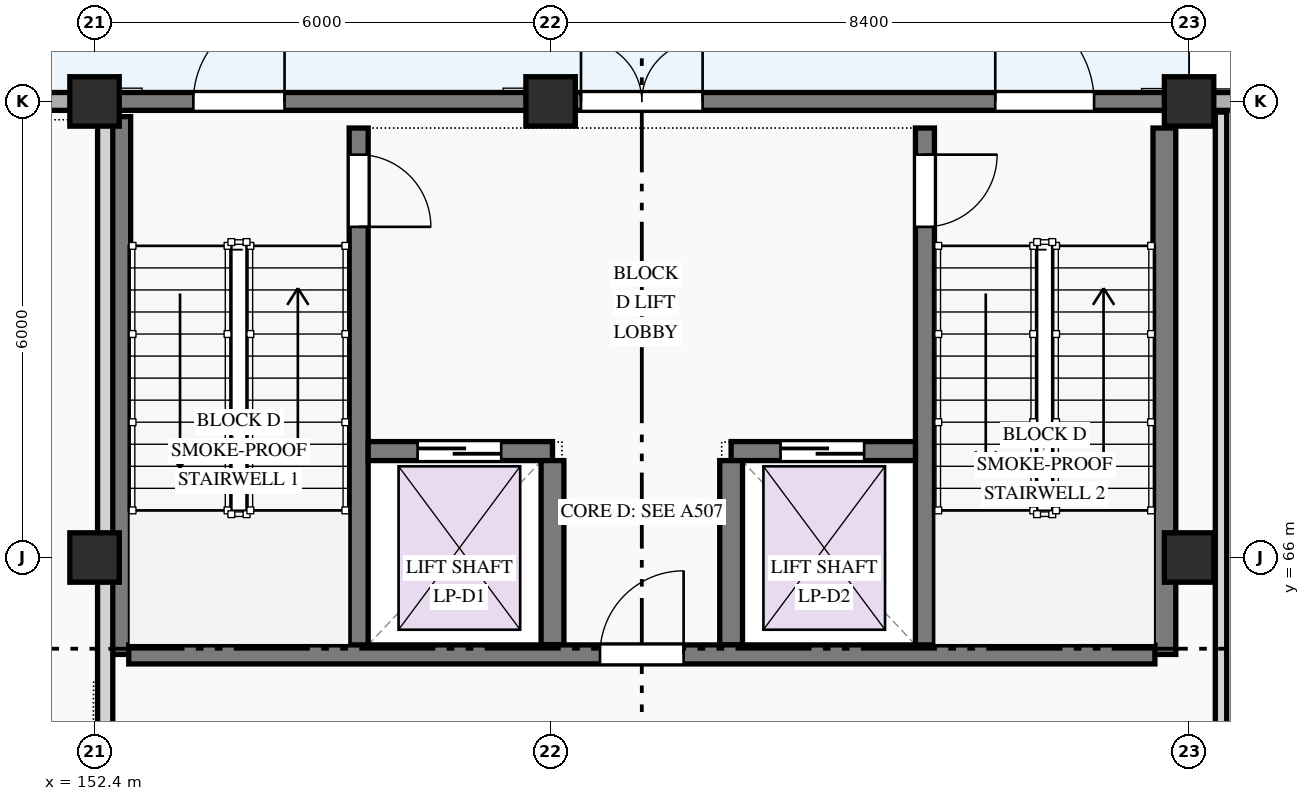
"""IFC4 building model, lengths in metres.
Left out: names, types, materials, properties, quantities, classifications, styles, units other than length and angle.
Written with IfcOpenShell. Run it as: python <this file> out.ifc"""

import sys

from ifc_helpers import new_model, si_unit, direction, frame, frame_2d, origin, origin_2d, place, context, subcontext, project, spatial, rectangle, extrude, element, fill, save


model = new_model("IFC4")
c1 = context("Model", 3, precision=1e-05, world=origin(), true_north=direction((0.0, 1.0)))
c2 = subcontext(c1, "Body", "Model", "MODEL_VIEW")
j1 = project(units=[si_unit("LENGTHUNIT", "METRE"), si_unit("PLANEANGLEUNIT", "RADIAN")], contexts=[c1])
p1 = place(None, origin())
s1 = spatial("IfcSite", under=j1, at=p1, CompositionType="ELEMENT")
p2 = place(p1, origin())
s2 = spatial("IfcBuilding", under=s1, at=p2, CompositionType="ELEMENT")
p3 = place(p2, origin())
s3 = spatial("IfcBuildingStorey", under=s2, at=p3, CompositionType="ELEMENT", Elevation=0.0)
for number, where, z_axis, x_axis in (
    (1, (152.4, 66.0, 0.0), (0.0, 0.0, 1.0), (1.0, 0.0, 0.0)),
    (2, (152.4, 72.0, 0.0), (0.0, 0.0, 1.0), (1.0, 0.0, 0.0)),
    (3, (158.4, 72.0, 0.0), (0.0, 0.0, 1.0), (1.0, 0.0, 0.0)),
    (4, (166.8, 66.0, 0.0), (0.0, 0.0, 1.0), (1.0, 0.0, 0.0)),
    (5, (166.8, 72.0, 0.0), (0.0, 0.0, 1.0), (1.0, 0.0, 0.0)),
):
    element("IfcColumn", number, at=place(p3, frame(where, z_axis=z_axis, x_axis=x_axis)), inside=s3, PredefinedType="COLUMN", context=c2, shape_type="SweptSolid", body=[
        extrude(rectangle(XDim=0.65, YDim=0.65, at=origin_2d()), origin(), (0.0, 0.0, 1.0), 4.5),
    ])
p4 = place(p3, frame((152.4, 72.0, 0.0), z_axis=(0.0, 0.0, 1.0), x_axis=(-1.0, 0.0, 0.0)))
e6 = element("IfcWall", 6, at=p4, inside=s3, PredefinedType="STANDARD", context=c2, shape_type="SweptSolid", body=[
    extrude(rectangle(XDim=8.4, YDim=0.235, at=frame_2d((4.2, 0.0))), origin(), (0.0, 0.0, 1.0), 3.485),
])
p5 = place(p4, frame((1.29, 0.0, 0.78)))
e7 = element("IfcOpeningElement", 7, at=p5, cuts=e6, PredefinedType="OPENING", context=c2, shape_type="SweptSolid", body=[
    extrude(rectangle(XDim=1.88, YDim=1.52, at=frame_2d((0.94, 0.76))), frame((0.0, 0.127, 0.0), z_axis=(0.0, -1.0, 0.0), x_axis=(1.0, 0.0, 0.0)), (0.0, 0.0, 1.0), 0.255),
])
p6 = place(p4, frame((5.05, 0.0, 0.78)))
e8 = element("IfcOpeningElement", 8, at=p6, cuts=e6, PredefinedType="OPENING", context=c2, shape_type="SweptSolid", body=[
    extrude(rectangle(XDim=2.24, YDim=1.52, at=frame_2d((1.12, 0.76))), frame((0.0, 0.127, 0.0), z_axis=(0.0, -1.0, 0.0), x_axis=(1.0, 0.0, 0.0)), (0.0, 0.0, 1.0), 0.255),
])
p7 = place(p3, frame((174.0, 72.0, 0.0), z_axis=(0.0, 0.0, 1.0), x_axis=(-1.0, 0.0, 0.0)))
e9 = element("IfcWall", 9, at=p7, inside=s3, PredefinedType="STANDARD", context=c2, shape_type="SweptSolid", body=[
    extrude(rectangle(XDim=7.2, YDim=0.235, at=frame_2d((3.6, 0.0))), origin(), (0.0, 0.0, 1.0), 3.485),
])
p8 = place(p7, frame((1.323, 0.0, 0.78)))
e10 = element("IfcOpeningElement", 10, at=p8, cuts=e9, PredefinedType="OPENING", context=c2, shape_type="SweptSolid", body=[
    extrude(rectangle(XDim=1.1, YDim=1.3, at=frame_2d((0.55, 0.65))), frame((0.0, 0.127, 0.0), z_axis=(0.0, -1.0, 0.0), x_axis=(1.0, 0.0, 0.0)), (0.0, 0.0, 1.0), 0.255),
])
p9 = place(p7, frame((4.347, 0.0, 0.78)))
e11 = element("IfcOpeningElement", 11, at=p9, cuts=e9, PredefinedType="OPENING", context=c2, shape_type="SweptSolid", body=[
    extrude(rectangle(XDim=1.5, YDim=1.5, at=frame_2d((0.75, 0.75))), frame((0.0, 0.127, 0.0), z_axis=(0.0, -1.0, 0.0), x_axis=(1.0, 0.0, 0.0)), (0.0, 0.0, 1.0), 0.255),
])
p10 = place(p3, frame((166.8, 72.0, 0.0), z_axis=(0.0, 0.0, 1.0), x_axis=(-1.0, 0.0, 0.0)))
e12 = element("IfcWall", 12, at=p10, inside=s3, PredefinedType="STANDARD", context=c2, shape_type="SweptSolid", body=[
    extrude(rectangle(XDim=8.4, YDim=0.235, at=frame_2d((4.2, 0.0))), origin(), (0.0, 0.0, 1.0), 4.2),
])
p11 = place(p10, frame((6.4, 0.0, 0.0)))
e13 = element("IfcOpeningElement", 13, at=p11, cuts=e12, PredefinedType="OPENING", context=c2, shape_type="SweptSolid", body=[
    extrude(rectangle(XDim=1.6, YDim=2.35, at=frame_2d((0.8, 1.175))), frame((0.0, 0.127, 0.0), z_axis=(0.0, -1.0, 0.0), x_axis=(1.0, 0.0, 0.0)), (0.0, 0.0, 1.0), 0.255),
])
p12 = place(p10, frame((1.25, 0.0, 0.0)))
e14 = element("IfcOpeningElement", 14, at=p12, cuts=e12, PredefinedType="OPENING", context=c2, shape_type="SweptSolid", body=[
    extrude(rectangle(XDim=1.3, YDim=2.2, at=frame_2d((0.65, 1.1))), frame((0.0, 0.127, 0.0), z_axis=(0.0, -1.0, 0.0), x_axis=(1.0, 0.0, 0.0)), (0.0, 0.0, 1.0), 0.255),
])
p13 = place(p3, frame((158.4, 72.0, 0.0), z_axis=(0.0, 0.0, 1.0), x_axis=(-1.0, 0.0, 0.0)))
e15 = element("IfcWall", 15, at=p13, inside=s3, PredefinedType="STANDARD", context=c2, shape_type="SweptSolid", body=[
    extrude(rectangle(XDim=6.0, YDim=0.235, at=frame_2d((3.0, 0.0))), origin(), (0.0, 0.0, 1.0), 4.2),
])
p14 = place(p13, frame((3.5, 0.0, 0.0)))
e16 = element("IfcOpeningElement", 16, at=p14, cuts=e15, PredefinedType="OPENING", context=c2, shape_type="SweptSolid", body=[
    extrude(rectangle(XDim=1.2, YDim=2.2, at=frame_2d((0.6, 1.1))), frame((0.0, 0.127, 0.0), z_axis=(0.0, -1.0, 0.0), x_axis=(1.0, 0.0, 0.0)), (0.0, 0.0, 1.0), 0.255),
])
p15 = place(p3, frame((155.875, 71.65, 0.0), z_axis=(0.0, 0.0, 1.0), x_axis=(0.0, -1.0, 0.0)))
e17 = element("IfcWall", 17, at=p15, inside=s3, PredefinedType="SHEAR", context=c2, shape_type="SweptSolid", body=[
    extrude(rectangle(XDim=6.925, YDim=0.25, at=frame_2d((3.462, 0.0))), origin(), (0.0, 0.0, 1.0), 4.2),
])
p16 = place(p15, frame((0.35, 0.0, 0.0)))
e18 = element("IfcOpeningElement", 18, at=p16, cuts=e17, PredefinedType="OPENING", context=c2, shape_type="SweptSolid", body=[
    extrude(rectangle(XDim=0.95, YDim=2.1, at=frame_2d((0.475, 1.05))), frame((0.0, 0.135, 0.0), z_axis=(0.0, -1.0, 0.0), x_axis=(1.0, 0.0, 0.0)), (0.0, 0.0, 1.0), 0.27),
])
p17 = place(p3, frame((152.725, 71.8, 0.0), z_axis=(0.0, 0.0, 1.0), x_axis=(0.0, -1.0, 0.0)))
e19 = element("IfcWall", 19, at=p17, inside=s3, PredefinedType="SHEAR", context=c2, shape_type="SweptSolid", body=[
    extrude(rectangle(XDim=7.075, YDim=0.3, at=frame_2d((3.538, 0.0))), origin(), (0.0, 0.0, 1.0), 4.2),
])
p18 = place(p3, frame((166.475, 71.65, 0.0), z_axis=(0.0, 0.0, 1.0), x_axis=(0.0, -1.0, 0.0)))
e20 = element("IfcWall", 20, at=p18, inside=s3, PredefinedType="SHEAR", context=c2, shape_type="SweptSolid", body=[
    extrude(rectangle(XDim=6.925, YDim=0.3, at=frame_2d((3.462, 0.0))), origin(), (0.0, 0.0, 1.0), 4.2),
])
p19 = place(p3, frame((163.325, 71.65, 0.0), z_axis=(0.0, 0.0, 1.0), x_axis=(0.0, -1.0, 0.0)))
e21 = element("IfcWall", 21, at=p19, inside=s3, PredefinedType="SHEAR", context=c2, shape_type="SweptSolid", body=[
    extrude(rectangle(XDim=6.925, YDim=0.25, at=frame_2d((3.462, 0.0))), origin(), (0.0, 0.0, 1.0), 4.2),
])
p20 = place(p19, frame((0.35, 0.0, 0.0)))
e22 = element("IfcOpeningElement", 22, at=p20, cuts=e21, PredefinedType="OPENING", context=c2, shape_type="SweptSolid", body=[
    extrude(rectangle(XDim=0.95, YDim=2.1, at=frame_2d((0.475, 1.05))), frame((0.0, 0.135, 0.0), z_axis=(0.0, -1.0, 0.0), x_axis=(1.0, 0.0, 0.0)), (0.0, 0.0, 1.0), 0.27),
])
p21 = place(p3, frame((156.0, 67.4, 0.0), z_axis=(0.0, 0.0, 1.0), x_axis=(1.0, 0.0, 0.0)))
e23 = element("IfcWall", 23, at=p21, inside=s3, PredefinedType="SHEAR", context=c2, shape_type="SweptSolid", body=[
    extrude(rectangle(XDim=2.425, YDim=0.25, at=frame_2d((1.212, 0.0))), origin(), (0.0, 0.0, 1.0), 4.2),
])
p22 = place(p21, frame((0.65, 0.0, 0.0)))
e24 = element("IfcOpeningElement", 24, at=p22, cuts=e23, PredefinedType="OPENING", context=c2, shape_type="SweptSolid", body=[
    extrude(rectangle(XDim=1.1, YDim=2.15, at=frame_2d((0.55, 1.075))), frame((0.0, 0.135, 0.0), z_axis=(0.0, -1.0, 0.0), x_axis=(1.0, 0.0, 0.0)), (0.0, 0.0, 1.0), 0.27),
])
p23 = place(p3, frame((160.775, 67.4, 0.0), z_axis=(0.0, 0.0, 1.0), x_axis=(1.0, 0.0, 0.0)))
e25 = element("IfcWall", 25, at=p23, inside=s3, PredefinedType="SHEAR", context=c2, shape_type="SweptSolid", body=[
    extrude(rectangle(XDim=2.425, YDim=0.25, at=frame_2d((1.212, 0.0))), origin(), (0.0, 0.0, 1.0), 4.2),
])
p24 = place(p23, frame((0.65, 0.0, 0.0)))
e26 = element("IfcOpeningElement", 26, at=p24, cuts=e25, PredefinedType="OPENING", context=c2, shape_type="SweptSolid", body=[
    extrude(rectangle(XDim=1.1, YDim=2.15, at=frame_2d((0.55, 1.075))), frame((0.0, 0.135, 0.0), z_axis=(0.0, -1.0, 0.0), x_axis=(1.0, 0.0, 0.0)), (0.0, 0.0, 1.0), 0.27),
])
for number, where, z_axis, x_axis in (
    (27, (158.425, 67.275, 0.0), (0.0, 0.0, 1.0), (0.0, -1.0, 0.0)),
    (28, (160.775, 67.275, 0.0), (0.0, 0.0, 1.0), (0.0, -1.0, 0.0)),
):
    element("IfcWall", number, at=place(p3, frame(where, z_axis=z_axis, x_axis=x_axis)), inside=s3, PredefinedType="SHEAR", context=c2, shape_type="SweptSolid", body=[
        extrude(rectangle(XDim=2.425, YDim=0.3, at=frame_2d((1.212, 0.0))), origin(), (0.0, 0.0, 1.0), 4.2),
    ])
p25 = place(p3, frame((152.85, 64.725, 0.0), z_axis=(0.0, 0.0, 1.0), x_axis=(1.0, 0.0, 0.0)))
e29 = element("IfcWall", 29, at=p25, inside=s3, PredefinedType="SHEAR", context=c2, shape_type="SweptSolid", body=[
    extrude(rectangle(XDim=13.5, YDim=0.25, at=frame_2d((6.75, 0.0))), origin(), (0.0, 0.0, 1.0), 4.2),
])
p26 = place(p25, frame((6.2, 0.0, 0.0)))
e30 = element("IfcOpeningElement", 30, at=p26, cuts=e29, PredefinedType="OPENING", context=c2, shape_type="SweptSolid", body=[
    extrude(rectangle(XDim=1.1, YDim=2.15, at=frame_2d((0.55, 1.075))), frame((0.0, 0.135, 0.0), z_axis=(0.0, -1.0, 0.0), x_axis=(1.0, 0.0, 0.0)), (0.0, 0.0, 1.0), 0.27),
])
p27 = place(p3, frame((167.22, 57.852, 0.0), z_axis=(0.0, 0.0, 1.0), x_axis=(0.0, 1.0, 0.0)))
e31 = element("IfcWall", 31, at=p27, inside=s3, PredefinedType="PARTITIONING", context=c2, shape_type="SweptSolid", body=[
    extrude(rectangle(XDim=14.008, YDim=0.15, at=frame_2d((7.004, 0.0))), origin(), (0.0, 0.0, 1.0), 3.485),
])
p28 = place(p27, frame((2.438, 0.0, 0.0)))
e32 = element("IfcOpeningElement", 32, at=p28, cuts=e31, PredefinedType="OPENING", context=c2, shape_type="SweptSolid", body=[
    extrude(rectangle(XDim=0.92, YDim=2.1, at=frame_2d((0.46, 1.05))), frame((0.0, 0.085, 0.0), z_axis=(0.0, -1.0, 0.0), x_axis=(1.0, 0.0, 0.0)), (0.0, 0.0, 1.0), 0.17),
])
p29 = place(p3, frame((152.54, 63.797, 0.0), z_axis=(0.0, 0.0, 1.0), x_axis=(0.0, 1.0, 0.0)))
e33 = element("IfcWall", 33, at=p29, inside=s3, PredefinedType="PARTITIONING", context=c2, shape_type="SweptSolid", body=[
    extrude(rectangle(XDim=8.083, YDim=0.2, at=frame_2d((4.042, 0.0))), origin(), (0.0, 0.0, 1.0), 3.485),
])
p30 = place(p11, frame((1.6, 0.0, 0.0), z_axis=(0.0, 0.0, 1.0), x_axis=(-1.0, 0.0, 0.0)))
e34 = element("IfcDoor", 34, at=p30, inside=s3, OperationType="DOUBLE_DOOR_SINGLE_SWING", PredefinedType="DOOR", context=c2, shape_type="SweptSolid", body=[
    extrude(rectangle(XDim=1.6, YDim=2.35, at=frame_2d((0.8, 1.175))), frame((0.0, 0.025, 0.0), z_axis=(0.0, -1.0, 0.0), x_axis=(1.0, 0.0, 0.0)), (0.0, 0.0, 1.0), 0.05),
])
fill(e13, e34)
p31 = place(p12, frame((1.3, 0.0, 0.0), z_axis=(0.0, 0.0, 1.0), x_axis=(-1.0, 0.0, 0.0)))
e35 = element("IfcDoor", 35, at=p31, inside=s3, OperationType="SINGLE_SWING_LEFT", PredefinedType="DOOR", context=c2, shape_type="SweptSolid", body=[
    extrude(rectangle(XDim=1.3, YDim=2.2, at=frame_2d((0.65, 1.1))), frame((0.0, 0.025, 0.0), z_axis=(0.0, -1.0, 0.0), x_axis=(1.0, 0.0, 0.0)), (0.0, 0.0, 1.0), 0.05),
])
fill(e14, e35)
p32 = place(p14, frame((1.2, 0.0, 0.0), z_axis=(0.0, 0.0, 1.0), x_axis=(-1.0, 0.0, 0.0)))
e36 = element("IfcDoor", 36, at=p32, inside=s3, OperationType="SINGLE_SWING_RIGHT", PredefinedType="DOOR", context=c2, shape_type="SweptSolid", body=[
    extrude(rectangle(XDim=1.2, YDim=2.2, at=frame_2d((0.6, 1.1))), frame((0.0, 0.025, 0.0), z_axis=(0.0, -1.0, 0.0), x_axis=(1.0, 0.0, 0.0)), (0.0, 0.0, 1.0), 0.05),
])
fill(e16, e36)
p33 = place(p16, origin())
e37 = element("IfcDoor", 37, at=p33, inside=s3, OperationType="SINGLE_SWING_RIGHT", PredefinedType="DOOR", context=c2, shape_type="SweptSolid", body=[
    extrude(rectangle(XDim=0.95, YDim=2.1, at=frame_2d((0.475, 1.05))), frame((0.0, 0.025, 0.0), z_axis=(0.0, -1.0, 0.0), x_axis=(1.0, 0.0, 0.0)), (0.0, 0.0, 1.0), 0.05),
])
fill(e18, e37)
p34 = place(p20, origin())
e38 = element("IfcDoor", 38, at=p34, inside=s3, OperationType="SINGLE_SWING_LEFT", PredefinedType="DOOR", context=c2, shape_type="SweptSolid", body=[
    extrude(rectangle(XDim=0.95, YDim=2.1, at=frame_2d((0.475, 1.05))), frame((0.0, 0.025, 0.0), z_axis=(0.0, -1.0, 0.0), x_axis=(1.0, 0.0, 0.0)), (0.0, 0.0, 1.0), 0.05),
])
fill(e22, e38)
p35 = place(p22, origin())
e39 = element("IfcDoor", 39, at=p35, inside=s3, OperationType="SLIDING_TO_LEFT", PredefinedType="DOOR", context=c2, shape_type="SweptSolid", body=[
    extrude(rectangle(XDim=1.1, YDim=2.15, at=frame_2d((0.55, 1.075))), frame((0.0, 0.025, 0.0), z_axis=(0.0, -1.0, 0.0), x_axis=(1.0, 0.0, 0.0)), (0.0, 0.0, 1.0), 0.05),
])
fill(e24, e39)
p36 = place(p24, origin())
e40 = element("IfcDoor", 40, at=p36, inside=s3, OperationType="SLIDING_TO_LEFT", PredefinedType="DOOR", context=c2, shape_type="SweptSolid", body=[
    extrude(rectangle(XDim=1.1, YDim=2.15, at=frame_2d((0.55, 1.075))), frame((0.0, 0.025, 0.0), z_axis=(0.0, -1.0, 0.0), x_axis=(1.0, 0.0, 0.0)), (0.0, 0.0, 1.0), 0.05),
])
fill(e26, e40)
p37 = place(p26, origin())
e41 = element("IfcDoor", 41, at=p37, inside=s3, OperationType="SINGLE_SWING_RIGHT", PredefinedType="DOOR", context=c2, shape_type="SweptSolid", body=[
    extrude(rectangle(XDim=1.1, YDim=2.15, at=frame_2d((0.55, 1.075))), frame((0.0, 0.025, 0.0), z_axis=(0.0, -1.0, 0.0), x_axis=(1.0, 0.0, 0.0)), (0.0, 0.0, 1.0), 0.05),
])
fill(e30, e41)
save(model, sys.argv[1])
